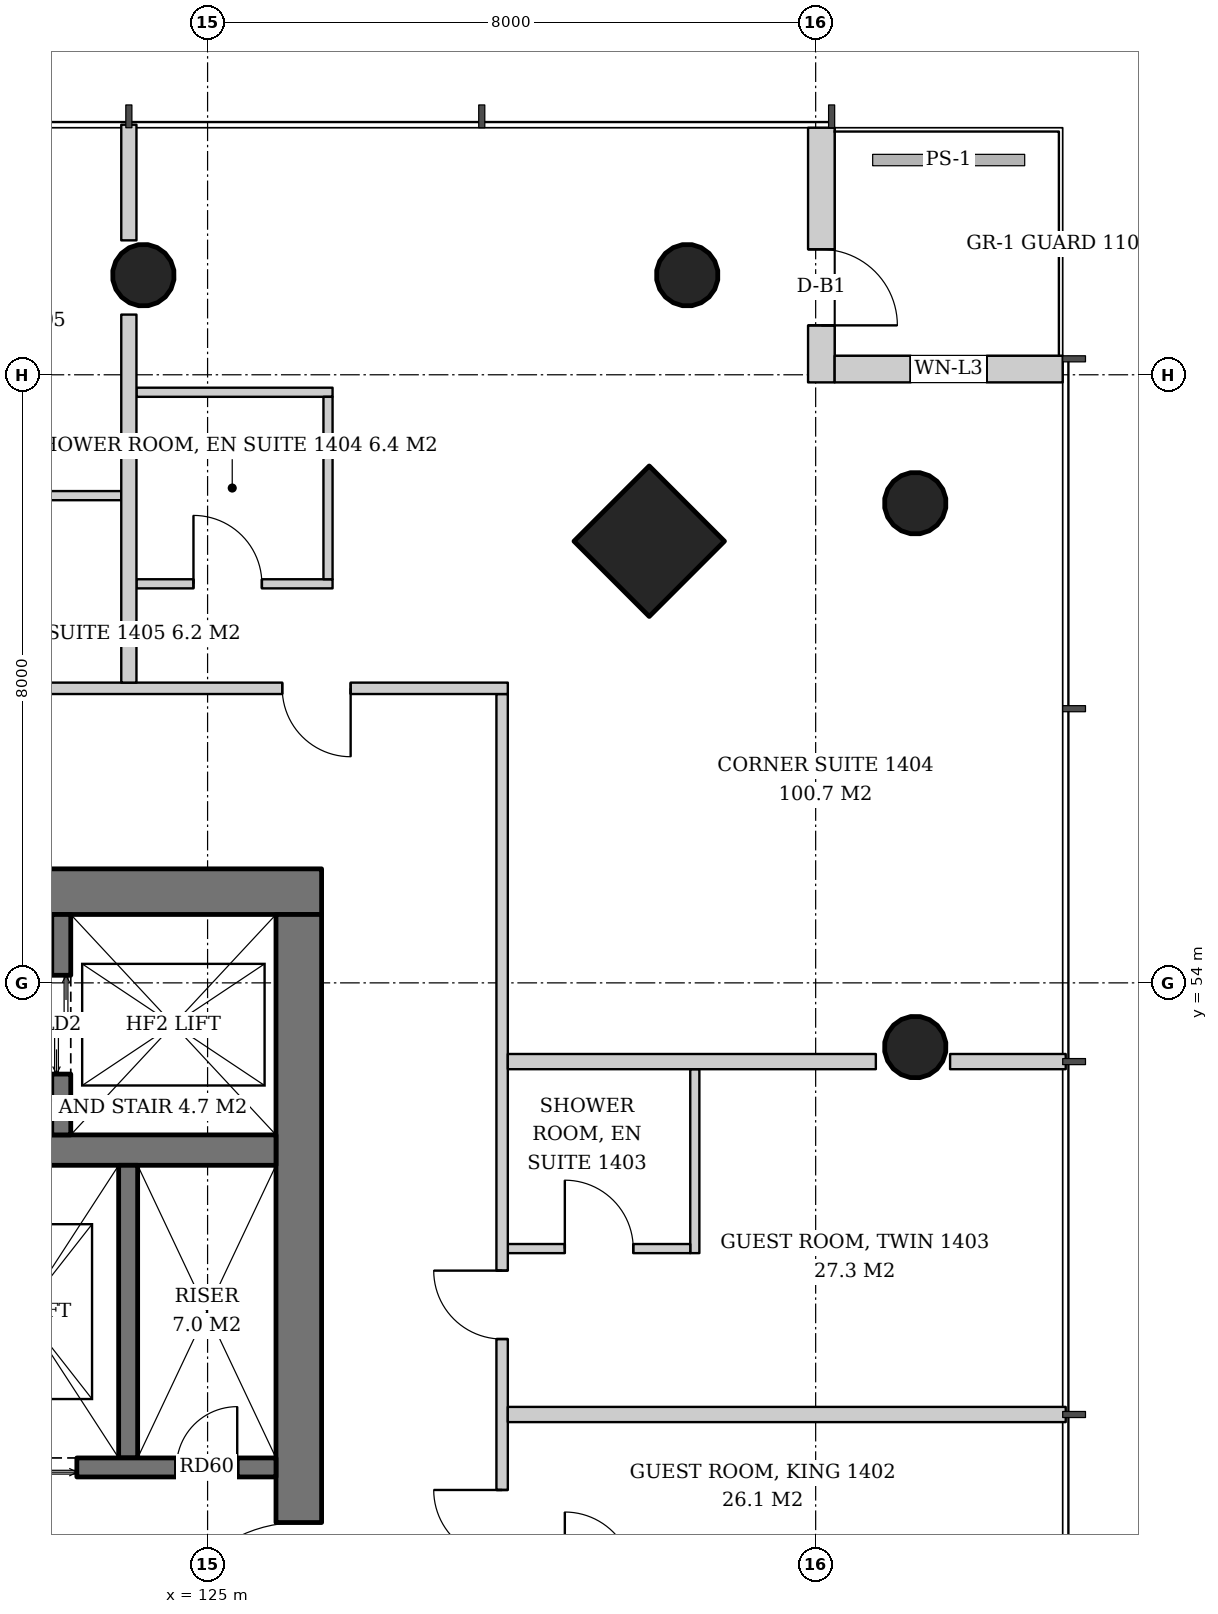
"""IFC4 building model, lengths in metres.
Left out: names, types, materials, properties, quantities, classifications, styles, units other than length and angle.
Written with IfcOpenShell. Run it as: python <this file> out.ifc"""

import sys

from ifc_helpers import new_model, si_unit, direction, frame, frame_2d, origin, origin_2d, place, context, subcontext, project, spatial, rectangle, hollow_circle, extrude, element, fill, save


model = new_model("IFC4")
c1 = context("Model", 3, precision=1e-05, world=origin(), true_north=direction((0.0, 1.0)))
c2 = subcontext(c1, "Body", "Model", "MODEL_VIEW")
j1 = project(units=[si_unit("LENGTHUNIT", "METRE"), si_unit("PLANEANGLEUNIT", "RADIAN")], contexts=[c1])
p1 = place(None, origin())
s1 = spatial("IfcSite", under=j1, at=p1, CompositionType="ELEMENT")
p2 = place(p1, origin())
s2 = spatial("IfcBuilding", under=s1, at=p2, CompositionType="ELEMENT")
p3 = place(p2, frame((0.0, 0.0, 59.0)))
s3 = spatial("IfcBuildingStorey", under=s2, at=p3, CompositionType="ELEMENT", Elevation=59.0)
p4 = place(p3, frame((130.862, 59.862, 0.0), z_axis=(-0.043029647111, -0.043029647111, 0.998146732169), x_axis=(0.707106781187, -0.707106781187, 0.0)))
e1 = element("IfcColumn", 1, at=p4, inside=s3, PredefinedType="COLUMN", context=c2, shape_type="SweptSolid", body=[
    extrude(rectangle(XDim=1.4, YDim=1.4, at=origin_2d()), origin(), (0.0, 0.0, 1.0), 3.807),
])
p5 = place(p3, frame((134.362, 60.362, 0.0), z_axis=(-0.043029647111, -0.043029647111, 0.998146732169), x_axis=(0.707106781187, -0.707106781187, 0.0)))
e2 = element("IfcColumn", 2, at=p5, inside=s3, PredefinedType="COLUMN", context=c2, shape_type="SweptSolid", body=[
    extrude(hollow_circle(Radius=0.406, WallThickness=0.03, at=origin_2d()), origin(), (0.0, 0.0, 1.0), 3.807),
])
p6 = place(p3, frame((134.362, 53.181, 0.0), z_axis=(-0.043059525333, -0.021561848751, 0.998839808957), x_axis=(0.44774654769, -0.894160516368, 0.0)))
e3 = element("IfcColumn", 3, at=p6, inside=s3, PredefinedType="COLUMN", context=c2, shape_type="SweptSolid", body=[
    extrude(hollow_circle(Radius=0.406, WallThickness=0.03, at=origin_2d()), origin(), (0.0, 0.0, 1.0), 3.804),
])
p7 = place(p3, frame((131.362, 63.362, 0.0), z_axis=(-0.043029647111, -0.043029647111, 0.998146732169), x_axis=(0.707106781187, -0.707106781187, 0.0)))
e4 = element("IfcColumn", 4, at=p7, inside=s3, PredefinedType="COLUMN", context=c2, shape_type="SweptSolid", body=[
    extrude(hollow_circle(Radius=0.406, WallThickness=0.03, at=origin_2d()), origin(), (0.0, 0.0, 1.0), 3.807),
])
p8 = place(p3, frame((124.181, 63.362, 0.0), z_axis=(-0.021561848751, -0.043059525333, 0.998839808957), x_axis=(0.894160516368, -0.44774654769, 0.0)))
e5 = element("IfcColumn", 5, at=p8, inside=s3, PredefinedType="COLUMN", context=c2, shape_type="SweptSolid", body=[
    extrude(hollow_circle(Radius=0.406, WallThickness=0.03, at=origin_2d()), origin(), (0.0, 0.0, 1.0), 3.804),
])
p9 = place(p3, frame((107.5, 55.2, 0.0), z_axis=(0.0, 0.0, 1.0), x_axis=(1.0, 0.0, 0.0)))
e6 = element("IfcWall", 6, at=p9, inside=s3, PredefinedType="SHEAR", context=c2, shape_type="SweptSolid", body=[
    extrude(rectangle(XDim=19.0, YDim=0.6, at=frame_2d((9.5, 0.0))), origin(), (0.0, 0.0, 1.0), 3.8),
])
p10 = place(p9, frame((14.14, 0.0, 0.0)))
e7 = element("IfcOpeningElement", 7, at=p10, cuts=e6, PredefinedType="OPENING", context=c2, shape_type="SweptSolid", body=[
    extrude(rectangle(XDim=1.0, YDim=2.1, at=frame_2d((0.5, 1.05))), frame((0.0, 0.31, 0.0), z_axis=(0.0, -1.0, 0.0), x_axis=(1.0, 0.0, 0.0)), (0.0, 0.0, 1.0), 0.62),
])
p11 = place(p9, frame((2.425, 0.0, 0.0)))
e8 = element("IfcOpeningElement", 8, at=p11, cuts=e6, PredefinedType="OPENING", context=c2, shape_type="SweptSolid", body=[
    extrude(rectangle(XDim=1.0, YDim=2.1, at=frame_2d((0.5, 1.05))), frame((0.0, 0.31, 0.0), z_axis=(0.0, -1.0, 0.0), x_axis=(1.0, 0.0, 0.0)), (0.0, 0.0, 1.0), 0.62),
])
p12 = place(p3, frame((126.2, 37.1, 0.0), z_axis=(0.0, 0.0, 1.0), x_axis=(0.0, 1.0, 0.0)))
e9 = element("IfcWall", 9, at=p12, inside=s3, PredefinedType="SHEAR", context=c2, shape_type="SweptSolid", body=[
    extrude(rectangle(XDim=17.8, YDim=0.6, at=frame_2d((8.9, 0.0))), origin(), (0.0, 0.0, 1.0), 3.8),
])
p13 = place(p12, frame((8.0, 0.0, 0.0)))
e10 = element("IfcOpeningElement", 10, at=p13, cuts=e9, PredefinedType="OPENING", context=c2, shape_type="SweptSolid", body=[
    extrude(rectangle(XDim=1.8, YDim=2.4, at=frame_2d((0.9, 1.2))), frame((0.0, 0.31, 0.0), z_axis=(0.0, -1.0, 0.0), x_axis=(1.0, 0.0, 0.0)), (0.0, 0.0, 1.0), 0.62),
])
p14 = place(p3, frame((108.1, 51.8, 0.0), z_axis=(0.0, 0.0, 1.0), x_axis=(1.0, 0.0, 0.0)))
e11 = element("IfcWall", 11, at=p14, inside=s3, PredefinedType="SHEAR", context=c2, shape_type="SweptSolid", body=[
    extrude(rectangle(XDim=17.8, YDim=0.4, at=frame_2d((8.9, 0.0))), origin(), (0.0, 0.0, 1.0), 3.8),
])
p15 = place(p3, frame((133.075, 65.25, 0.0), z_axis=(0.0, 0.0, 1.0), x_axis=(0.0, -1.0, 0.0)))
e12 = element("IfcWall", 12, at=p15, inside=s3, PredefinedType="SOLIDWALL", context=c2, shape_type="SweptSolid", body=[
    extrude(rectangle(XDim=3.35, YDim=0.35, at=frame_2d((1.675, 0.0))), origin(), (0.0, 0.0, 1.0), 3.6),
])
p16 = place(p15, frame((1.6, 0.0, 0.0)))
e13 = element("IfcOpeningElement", 13, at=p16, cuts=e12, PredefinedType="OPENING", context=c2, shape_type="SweptSolid", body=[
    extrude(rectangle(XDim=1.0, YDim=2.4, at=frame_2d((0.5, 1.2))), frame((0.0, 0.185, 0.0), z_axis=(0.0, -1.0, 0.0), x_axis=(1.0, 0.0, 0.0)), (0.0, 0.0, 1.0), 0.37),
])
p17 = place(p3, frame((133.25, 62.075, 0.0), z_axis=(0.0, 0.0, 1.0), x_axis=(1.0, 0.0, 0.0)))
e14 = element("IfcWall", 14, at=p17, inside=s3, PredefinedType="SOLIDWALL", context=c2, shape_type="SweptSolid", body=[
    extrude(rectangle(XDim=3.0, YDim=0.35, at=frame_2d((1.5, 0.0))), origin(), (0.0, 0.0, 1.0), 3.6),
])
p18 = place(p17, frame((1.0, 0.0, 0.9)))
e15 = element("IfcOpeningElement", 15, at=p18, cuts=e14, PredefinedType="OPENING", context=c2, shape_type="SweptSolid", body=[
    extrude(rectangle(XDim=1.0, YDim=2.4, at=frame_2d((0.5, 1.2))), frame((0.0, 0.185, 0.0), z_axis=(0.0, -1.0, 0.0), x_axis=(1.0, 0.0, 0.0)), (0.0, 0.0, 1.0), 0.37),
])
p19 = place(p3, frame((123.075, 52.0, 0.0), z_axis=(0.0, 0.0, 1.0), x_axis=(0.0, 1.0, 0.0)))
e16 = element("IfcWall", 16, at=p19, inside=s3, PredefinedType="SHEAR", context=c2, shape_type="SweptSolid", body=[
    extrude(rectangle(XDim=2.9, YDim=0.25, at=frame_2d((1.45, 0.0))), origin(), (0.0, 0.0, 1.0), 3.8),
])
p20 = place(p19, frame((0.8, 0.0, 0.0)))
e17 = element("IfcOpeningElement", 17, at=p20, cuts=e16, PredefinedType="OPENING", context=c2, shape_type="SweptSolid", body=[
    extrude(rectangle(XDim=1.3, YDim=2.2, at=frame_2d((0.65, 1.1))), frame((0.0, 0.135, 0.0), z_axis=(0.0, -1.0, 0.0), x_axis=(1.0, 0.0, 0.0)), (0.0, 0.0, 1.0), 0.27),
])
p21 = place(p3, frame((123.955, 47.75, 0.0), z_axis=(0.0, 0.0, 1.0), x_axis=(0.0, 1.0, 0.0)))
e18 = element("IfcWall", 18, at=p21, inside=s3, PredefinedType="SHEAR", context=c2, shape_type="SweptSolid", body=[
    extrude(rectangle(XDim=3.85, YDim=0.25, at=frame_2d((1.925, 0.0))), origin(), (0.0, 0.0, 1.0), 3.8),
])
p22 = place(p3, frame((121.33, 47.625, 0.0), z_axis=(0.0, 0.0, 1.0), x_axis=(1.0, 0.0, 0.0)))
e19 = element("IfcWall", 19, at=p22, inside=s3, PredefinedType="SHEAR", context=c2, shape_type="SweptSolid", body=[
    extrude(rectangle(XDim=4.57, YDim=0.25, at=frame_2d((2.285, 0.0))), origin(), (0.0, 0.0, 1.0), 3.8),
])
p23 = place(p22, frame((0.55, 0.0, 0.0)))
e20 = element("IfcOpeningElement", 20, at=p23, cuts=e19, PredefinedType="OPENING", context=c2, shape_type="SweptSolid", body=[
    extrude(rectangle(XDim=1.4, YDim=2.4, at=frame_2d((0.7, 1.2))), frame((0.0, 0.135, 0.0), z_axis=(0.0, -1.0, 0.0), x_axis=(1.0, 0.0, 0.0)), (0.0, 0.0, 1.0), 0.27),
])
p24 = place(p22, frame((3.26, 0.0, 0.0)))
e21 = element("IfcOpeningElement", 21, at=p24, cuts=e19, PredefinedType="OPENING", context=c2, shape_type="SweptSolid", body=[
    extrude(rectangle(XDim=0.8, YDim=2.0, at=frame_2d((0.4, 1.0))), frame((0.0, 0.135, 0.0), z_axis=(0.0, -1.0, 0.0), x_axis=(1.0, 0.0, 0.0)), (0.0, 0.0, 1.0), 0.27),
])
p25 = place(p3, frame((131.41, 50.444, 0.0), z_axis=(0.0, 0.0, 1.0), x_axis=(0.0, 1.0, 0.0)))
e22 = element("IfcWall", 22, at=p25, inside=s3, PredefinedType="PARTITIONING", context=c2, shape_type="SweptSolid", body=[
    extrude(rectangle(XDim=2.42, YDim=0.12, at=frame_2d((1.21, 0.0))), origin(), (0.0, 0.0, 1.0), 3.6),
])
p26 = place(p3, frame((128.95, 50.504, 0.0), z_axis=(0.0, 0.0, 1.0), x_axis=(1.0, 0.0, 0.0)))
e23 = element("IfcWall", 23, at=p26, inside=s3, PredefinedType="PARTITIONING", context=c2, shape_type="SweptSolid", body=[
    extrude(rectangle(XDim=2.4, YDim=0.12, at=frame_2d((1.2, 0.0))), origin(), (0.0, 0.0, 1.0), 3.6),
])
p27 = place(p26, frame((0.75, 0.0, 0.0)))
e24 = element("IfcOpeningElement", 24, at=p27, cuts=e23, PredefinedType="OPENING", context=c2, shape_type="SweptSolid", body=[
    extrude(rectangle(XDim=0.9, YDim=2.1, at=frame_2d((0.45, 1.05))), frame((0.0, 0.07, 0.0), z_axis=(0.0, -1.0, 0.0), x_axis=(1.0, 0.0, 0.0)), (0.0, 0.0, 1.0), 0.14),
])
p28 = place(p3, frame((128.875, 34.05, 0.0), z_axis=(0.0, 0.0, 1.0), x_axis=(0.0, 1.0, 0.0)))
e25 = element("IfcWall", 25, at=p28, inside=s3, PredefinedType="PARTITIONING", context=c2, shape_type="SweptSolid", body=[
    extrude(rectangle(XDim=23.75, YDim=0.15, at=frame_2d((11.875, 0.0))), origin(), (0.0, 0.0, 1.0), 2.8),
])
p29 = place(p28, frame((2.068, 0.0, 0.0)))
e26 = element("IfcOpeningElement", 26, at=p29, cuts=e25, PredefinedType="OPENING", context=c2, shape_type="SweptSolid", body=[
    extrude(rectangle(XDim=0.9, YDim=2.1, at=frame_2d((0.45, 1.05))), frame((0.0, 0.085, 0.0), z_axis=(0.0, -1.0, 0.0), x_axis=(1.0, 0.0, 0.0)), (0.0, 0.0, 1.0), 0.17),
])
p30 = place(p28, frame((12.379, 0.0, 0.0)))
e27 = element("IfcOpeningElement", 27, at=p30, cuts=e25, PredefinedType="OPENING", context=c2, shape_type="SweptSolid", body=[
    extrude(rectangle(XDim=0.9, YDim=2.1, at=frame_2d((0.45, 1.05))), frame((0.0, 0.085, 0.0), z_axis=(0.0, -1.0, 0.0), x_axis=(1.0, 0.0, 0.0)), (0.0, 0.0, 1.0), 0.17),
])
p31 = place(p28, frame((15.264, 0.0, 0.0)))
e28 = element("IfcOpeningElement", 28, at=p31, cuts=e25, PredefinedType="OPENING", context=c2, shape_type="SweptSolid", body=[
    extrude(rectangle(XDim=0.9, YDim=2.1, at=frame_2d((0.45, 1.05))), frame((0.0, 0.085, 0.0), z_axis=(0.0, -1.0, 0.0), x_axis=(1.0, 0.0, 0.0)), (0.0, 0.0, 1.0), 0.17),
])
p32 = place(p3, frame((128.95, 48.322, 0.0), z_axis=(0.0, 0.0, 1.0), x_axis=(1.0, 0.0, 0.0)))
e29 = element("IfcWall", 29, at=p32, inside=s3, PredefinedType="PARTITIONING", context=c2, shape_type="SweptSolid", body=[
    extrude(rectangle(XDim=7.34, YDim=0.2, at=frame_2d((3.67, 0.0))), origin(), (0.0, 0.0, 1.0), 3.05),
])
p33 = place(p3, frame((128.95, 52.964, 0.0), z_axis=(0.0, 0.0, 1.0), x_axis=(1.0, 0.0, 0.0)))
e30 = element("IfcWall", 30, at=p33, inside=s3, PredefinedType="PARTITIONING", context=c2, shape_type="SweptSolid", body=[
    extrude(rectangle(XDim=4.842, YDim=0.2, at=frame_2d((2.421, 0.0))), origin(), (0.0, 0.0, 1.0), 3.6),
])
p34 = place(p3, frame((134.769, 52.964, 0.0), z_axis=(0.0, 0.0, 1.0), x_axis=(1.0, 0.0, 0.0)))
e31 = element("IfcWall", 31, at=p34, inside=s3, PredefinedType="PARTITIONING", context=c2, shape_type="SweptSolid", body=[
    extrude(rectangle(XDim=1.521, YDim=0.2, at=frame_2d((0.761, 0.0))), origin(), (0.0, 0.0, 1.0), 3.6),
])
p35 = place(p3, frame((124.064, 59.25, 0.0), z_axis=(0.0, 0.0, 1.0), x_axis=(1.0, 0.0, 0.0)))
e32 = element("IfcWall", 32, at=p35, inside=s3, PredefinedType="PARTITIONING", context=c2, shape_type="SweptSolid", body=[
    extrude(rectangle(XDim=2.58, YDim=0.12, at=frame_2d((1.29, 0.0))), origin(), (0.0, 0.0, 1.0), 2.8),
])
p36 = place(p35, frame((0.75, 0.0, 0.0)))
e33 = element("IfcOpeningElement", 33, at=p36, cuts=e32, PredefinedType="OPENING", context=c2, shape_type="SweptSolid", body=[
    extrude(rectangle(XDim=0.9, YDim=2.1, at=frame_2d((0.45, 1.05))), frame((0.0, 0.07, 0.0), z_axis=(0.0, -1.0, 0.0), x_axis=(1.0, 0.0, 0.0)), (0.0, 0.0, 1.0), 0.14),
])
p37 = place(p3, frame((124.064, 61.77, 0.0), z_axis=(0.0, 0.0, 1.0), x_axis=(1.0, 0.0, 0.0)))
e34 = element("IfcWall", 34, at=p37, inside=s3, PredefinedType="PARTITIONING", context=c2, shape_type="SweptSolid", body=[
    extrude(rectangle(XDim=2.58, YDim=0.12, at=frame_2d((1.29, 0.0))), origin(), (0.0, 0.0, 1.0), 2.8),
])
p38 = place(p3, frame((126.584, 59.31, 0.0), z_axis=(0.0, 0.0, 1.0), x_axis=(0.0, 1.0, 0.0)))
e35 = element("IfcWall", 35, at=p38, inside=s3, PredefinedType="PARTITIONING", context=c2, shape_type="SweptSolid", body=[
    extrude(rectangle(XDim=2.4, YDim=0.12, at=frame_2d((1.2, 0.0))), origin(), (0.0, 0.0, 1.0), 3.6),
])
p39 = place(p3, frame((123.864, 60.41, 0.0), z_axis=(0.0, 0.0, 1.0), x_axis=(-1.0, 0.0, 0.0)))
e36 = element("IfcWall", 36, at=p39, inside=s3, PredefinedType="PARTITIONING", context=c2, shape_type="SweptSolid", body=[
    extrude(rectangle(XDim=2.42, YDim=0.12, at=frame_2d((1.21, 0.0))), origin(), (0.0, 0.0, 1.0), 2.847),
])
p40 = place(p3, frame((128.95, 57.875, 0.0), z_axis=(0.0, 0.0, 1.0), x_axis=(-1.0, 0.0, 0.0)))
e37 = element("IfcWall", 37, at=p40, inside=s3, PredefinedType="PARTITIONING", context=c2, shape_type="SweptSolid", body=[
    extrude(rectangle(XDim=23.75, YDim=0.15, at=frame_2d((11.875, 0.0))), origin(), (0.0, 0.0, 1.0), 2.8),
])
p41 = place(p40, frame((2.068, 0.0, 0.0)))
e38 = element("IfcOpeningElement", 38, at=p41, cuts=e37, PredefinedType="OPENING", context=c2, shape_type="SweptSolid", body=[
    extrude(rectangle(XDim=0.9, YDim=2.1, at=frame_2d((0.45, 1.05))), frame((0.0, 0.085, 0.0), z_axis=(0.0, -1.0, 0.0), x_axis=(1.0, 0.0, 0.0)), (0.0, 0.0, 1.0), 0.17),
])
p42 = place(p40, frame((7.736, 0.0, 0.0)))
e39 = element("IfcOpeningElement", 39, at=p42, cuts=e37, PredefinedType="OPENING", context=c2, shape_type="SweptSolid", body=[
    extrude(rectangle(XDim=0.9, YDim=2.1, at=frame_2d((0.45, 1.05))), frame((0.0, 0.085, 0.0), z_axis=(0.0, -1.0, 0.0), x_axis=(1.0, 0.0, 0.0)), (0.0, 0.0, 1.0), 0.17),
])
p43 = place(p40, frame((10.621, 0.0, 0.0)))
e40 = element("IfcOpeningElement", 40, at=p43, cuts=e37, PredefinedType="OPENING", context=c2, shape_type="SweptSolid", body=[
    extrude(rectangle(XDim=0.9, YDim=2.1, at=frame_2d((0.45, 1.05))), frame((0.0, 0.085, 0.0), z_axis=(0.0, -1.0, 0.0), x_axis=(1.0, 0.0, 0.0)), (0.0, 0.0, 1.0), 0.17),
])
p44 = place(p40, frame((17.021, 0.0, 0.0)))
e41 = element("IfcOpeningElement", 41, at=p44, cuts=e37, PredefinedType="OPENING", context=c2, shape_type="SweptSolid", body=[
    extrude(rectangle(XDim=0.9, YDim=2.1, at=frame_2d((0.45, 1.05))), frame((0.0, 0.085, 0.0), z_axis=(0.0, -1.0, 0.0), x_axis=(1.0, 0.0, 0.0)), (0.0, 0.0, 1.0), 0.17),
])
p45 = place(p3, frame((123.964, 57.95, 0.0), z_axis=(0.0, 0.0, 1.0), x_axis=(0.0, 1.0, 0.0)))
e42 = element("IfcWall", 42, at=p45, inside=s3, PredefinedType="PARTITIONING", context=c2, shape_type="SweptSolid", body=[
    extrude(rectangle(XDim=4.842, YDim=0.2, at=frame_2d((2.421, 0.0))), origin(), (0.0, 0.0, 1.0), 3.6),
])
p46 = place(p3, frame((123.964, 63.769, 0.0), z_axis=(0.0, 0.0, 1.0), x_axis=(0.0, 1.0, 0.0)))
e43 = element("IfcWall", 43, at=p46, inside=s3, PredefinedType="PARTITIONING", context=c2, shape_type="SweptSolid", body=[
    extrude(rectangle(XDim=1.521, YDim=0.2, at=frame_2d((0.761, 0.0))), origin(), (0.0, 0.0, 1.0), 3.6),
])
p47 = place(p16, origin())
e44 = element("IfcDoor", 44, at=p47, inside=s3, OperationType="SINGLE_SWING_RIGHT", PredefinedType="DOOR", context=c2, shape_type="SweptSolid", body=[
    extrude(rectangle(XDim=1.0, YDim=2.4, at=frame_2d((0.5, 1.2))), frame((0.0, 0.025, 0.0), z_axis=(0.0, -1.0, 0.0), x_axis=(1.0, 0.0, 0.0)), (0.0, 0.0, 1.0), 0.05),
])
fill(e13, e44)
p48 = place(p18, origin())
e45 = element("IfcWindow", 45, at=p48, inside=s3, PartitioningType="SINGLE_PANEL", PredefinedType="WINDOW", context=c2, shape_type="SweptSolid", body=[
    extrude(rectangle(XDim=1.0, YDim=2.4, at=frame_2d((0.5, 1.2))), frame((0.0, 0.03, 0.0), z_axis=(0.0, -1.0, 0.0), x_axis=(1.0, 0.0, 0.0)), (0.0, 0.0, 1.0), 0.06),
])
fill(e15, e45)
p49 = place(p20, origin())
e46 = element("IfcDoor", 46, at=p49, inside=s3, OperationType="DOUBLE_DOOR_SLIDING", PredefinedType="DOOR", context=c2, shape_type="SweptSolid", body=[
    extrude(rectangle(XDim=1.3, YDim=2.2, at=frame_2d((0.65, 1.1))), frame((0.0, 0.025, 0.0), z_axis=(0.0, -1.0, 0.0), x_axis=(1.0, 0.0, 0.0)), (0.0, 0.0, 1.0), 0.05),
])
fill(e17, e46)
p50 = place(p23, origin())
e47 = element("IfcDoor", 47, at=p50, inside=s3, OperationType="DOUBLE_DOOR_SLIDING", PredefinedType="DOOR", context=c2, shape_type="SweptSolid", body=[
    extrude(rectangle(XDim=1.4, YDim=2.4, at=frame_2d((0.7, 1.2))), frame((0.0, 0.025, 0.0), z_axis=(0.0, -1.0, 0.0), x_axis=(1.0, 0.0, 0.0)), (0.0, 0.0, 1.0), 0.05),
])
fill(e20, e47)
p51 = place(p24, origin())
e48 = element("IfcDoor", 48, at=p51, inside=s3, OperationType="SINGLE_SWING_RIGHT", PredefinedType="DOOR", context=c2, shape_type="SweptSolid", body=[
    extrude(rectangle(XDim=0.8, YDim=2.0, at=frame_2d((0.4, 1.0))), frame((0.0, 0.025, 0.0), z_axis=(0.0, -1.0, 0.0), x_axis=(1.0, 0.0, 0.0)), (0.0, 0.0, 1.0), 0.05),
])
fill(e21, e48)
p52 = place(p13, origin())
e49 = element("IfcDoor", 49, at=p52, inside=s3, OperationType="DOUBLE_DOOR_SINGLE_SWING", PredefinedType="DOOR", context=c2, shape_type="SweptSolid", body=[
    extrude(rectangle(XDim=1.8, YDim=2.4, at=frame_2d((0.9, 1.2))), frame((0.0, 0.025, 0.0), z_axis=(0.0, -1.0, 0.0), x_axis=(1.0, 0.0, 0.0)), (0.0, 0.0, 1.0), 0.05),
])
fill(e10, e49)
p53 = place(p27, origin())
e50 = element("IfcDoor", 50, at=p53, inside=s3, OperationType="SINGLE_SWING_LEFT", PredefinedType="DOOR", context=c2, shape_type="SweptSolid", body=[
    extrude(rectangle(XDim=0.9, YDim=2.1, at=frame_2d((0.45, 1.05))), frame((0.0, 0.025, 0.0), z_axis=(0.0, -1.0, 0.0), x_axis=(1.0, 0.0, 0.0)), (0.0, 0.0, 1.0), 0.05),
])
fill(e24, e50)
p54 = place(p30, origin())
e51 = element("IfcDoor", 51, at=p54, inside=s3, OperationType="SINGLE_SWING_RIGHT", PredefinedType="DOOR", context=c2, shape_type="SweptSolid", body=[
    extrude(rectangle(XDim=0.9, YDim=2.1, at=frame_2d((0.45, 1.05))), frame((0.0, 0.025, 0.0), z_axis=(0.0, -1.0, 0.0), x_axis=(1.0, 0.0, 0.0)), (0.0, 0.0, 1.0), 0.05),
])
fill(e27, e51)
p55 = place(p31, origin())
e52 = element("IfcDoor", 52, at=p55, inside=s3, OperationType="SINGLE_SWING_RIGHT", PredefinedType="DOOR", context=c2, shape_type="SweptSolid", body=[
    extrude(rectangle(XDim=0.9, YDim=2.1, at=frame_2d((0.45, 1.05))), frame((0.0, 0.025, 0.0), z_axis=(0.0, -1.0, 0.0), x_axis=(1.0, 0.0, 0.0)), (0.0, 0.0, 1.0), 0.05),
])
fill(e28, e52)
p56 = place(p36, origin())
e53 = element("IfcDoor", 53, at=p56, inside=s3, OperationType="SINGLE_SWING_LEFT", PredefinedType="DOOR", context=c2, shape_type="SweptSolid", body=[
    extrude(rectangle(XDim=0.9, YDim=2.1, at=frame_2d((0.45, 1.05))), frame((0.0, 0.025, 0.0), z_axis=(0.0, -1.0, 0.0), x_axis=(1.0, 0.0, 0.0)), (0.0, 0.0, 1.0), 0.05),
])
fill(e33, e53)
p57 = place(p41, origin())
e54 = element("IfcDoor", 54, at=p57, inside=s3, OperationType="SINGLE_SWING_LEFT", PredefinedType="DOOR", context=c2, shape_type="SweptSolid", body=[
    extrude(rectangle(XDim=0.9, YDim=2.1, at=frame_2d((0.45, 1.05))), frame((0.0, 0.025, 0.0), z_axis=(0.0, -1.0, 0.0), x_axis=(1.0, 0.0, 0.0)), (0.0, 0.0, 1.0), 0.05),
])
fill(e38, e54)
save(model, sys.argv[1])
